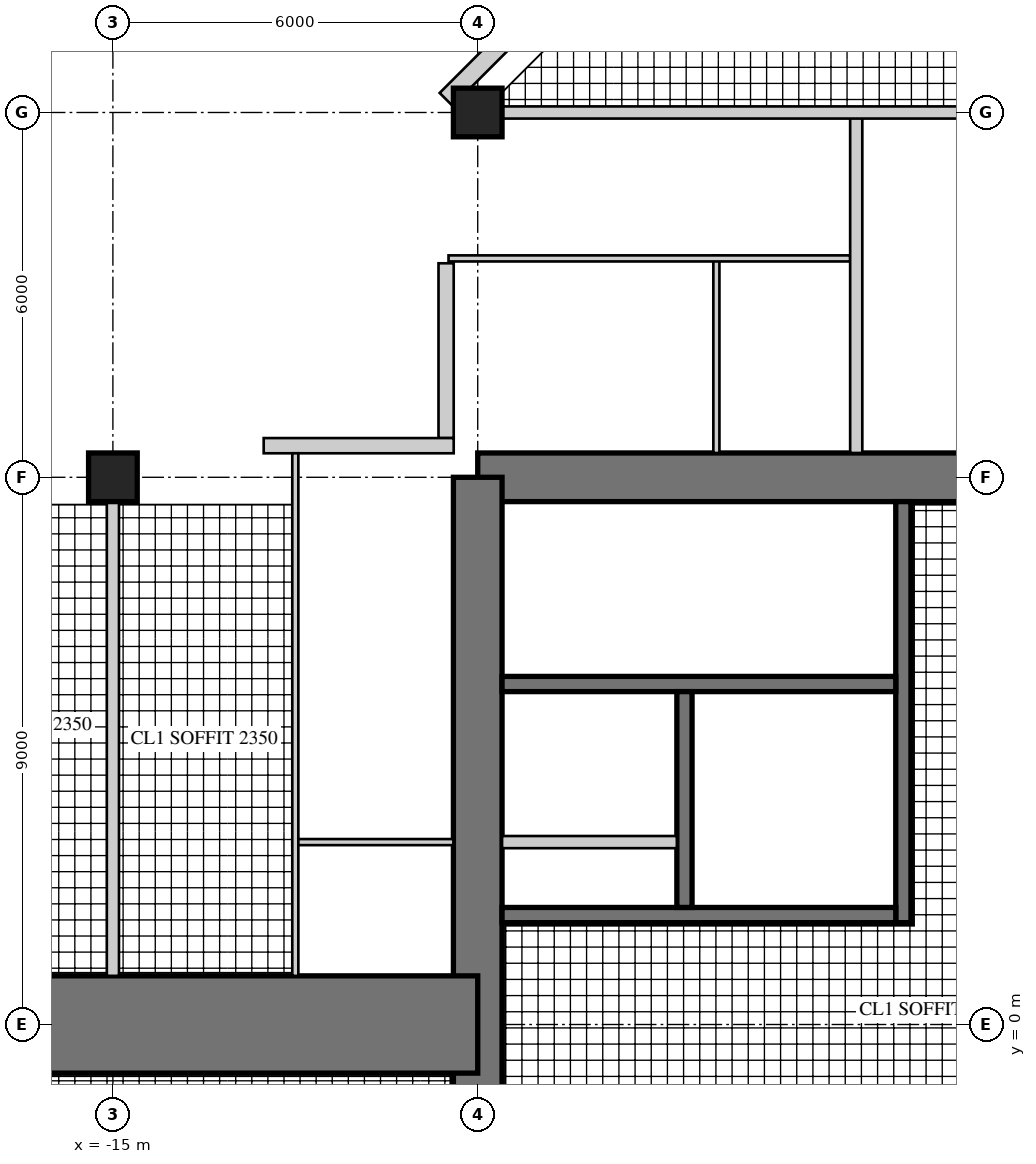
"""IFC4 building model, lengths in metres.
Left out: names, types, materials, properties, quantities, classifications, styles, units other than length and angle.
Written with IfcOpenShell. Run it as: python <this file> out.ifc"""

import sys

from ifc_helpers import new_model, si_unit, direction, frame, frame_2d, origin, origin_2d, place, context, subcontext, project, spatial, rectangle, hollow_rectangle, extrude, element, fill, save


model = new_model("IFC4")
c1 = context("Model", 3, precision=1e-05, world=origin(), true_north=direction((0.0, 1.0)))
c2 = subcontext(c1, "Body", "Model", "MODEL_VIEW")
j1 = project(units=[si_unit("LENGTHUNIT", "METRE"), si_unit("PLANEANGLEUNIT", "RADIAN")], contexts=[c1])
p1 = place(None, origin())
s1 = spatial("IfcSite", under=j1, at=p1, CompositionType="ELEMENT")
p2 = place(p1, origin())
s2 = spatial("IfcBuilding", under=s1, at=p2, CompositionType="ELEMENT")
p3 = place(p2, frame((0.0, 0.0, 235.7)))
s3 = spatial("IfcBuildingStorey", under=s2, at=p3, CompositionType="ELEMENT", Elevation=235.7)
p4 = place(p3, frame((9.0, 9.0, 0.0), z_axis=(0.0, 0.0, 1.0), x_axis=(-1.0, 0.0, 0.0)))
e1 = element("IfcWall", 1, at=p4, inside=s3, PredefinedType="SHEAR", context=c2, shape_type="SweptSolid", body=[
    extrude(rectangle(XDim=18.0, YDim=0.8, at=frame_2d((9.0, 0.0))), origin(), (0.0, 0.0, 1.0), 3.4),
])
p5 = place(p4, frame((9.8, 0.0, 0.0)))
e2 = element("IfcOpeningElement", 2, at=p5, cuts=e1, PredefinedType="OPENING", context=c2, shape_type="SweptSolid", body=[
    extrude(rectangle(XDim=1.0, YDim=2.4, at=frame_2d((0.5, 1.2))), frame((0.0, 0.41, 0.0), z_axis=(0.0, -1.0, 0.0), x_axis=(1.0, 0.0, 0.0)), (0.0, 0.0, 1.0), 0.82),
])
p6 = place(p3, frame((-9.0, 9.0, 0.0), z_axis=(0.0, 0.0, 1.0), x_axis=(0.0, -1.0, 0.0)))
e3 = element("IfcWall", 3, at=p6, inside=s3, PredefinedType="SHEAR", context=c2, shape_type="SweptSolid", body=[
    extrude(rectangle(XDim=18.0, YDim=0.8, at=frame_2d((9.0, 0.0))), origin(), (0.0, 0.0, 1.0), 3.4),
])
p7 = place(p6, frame((9.8, 0.0, 0.0)))
e4 = element("IfcOpeningElement", 4, at=p7, cuts=e3, PredefinedType="OPENING", context=c2, shape_type="SweptSolid", body=[
    extrude(rectangle(XDim=1.0, YDim=2.4, at=frame_2d((0.5, 1.2))), frame((0.0, 0.41, 0.0), z_axis=(0.0, -1.0, 0.0), x_axis=(1.0, 0.0, 0.0)), (0.0, 0.0, 1.0), 0.82),
])
p8 = place(p3, frame((-2.0, 1.675, 0.0), z_axis=(0.0, 0.0, 1.0), x_axis=(0.0, 1.0, 0.0)))
e5 = element("IfcWall", 5, at=p8, inside=s3, PredefinedType="SHEAR", context=c2, shape_type="SweptSolid", body=[
    extrude(rectangle(XDim=6.925, YDim=0.25, at=frame_2d((3.462, 0.0))), origin(), (0.0, 0.0, 1.0), 3.4),
])
p9 = place(p8, frame((0.725, 0.0, 0.0)))
e6 = element("IfcOpeningElement", 6, at=p9, cuts=e5, PredefinedType="OPENING", context=c2, shape_type="SweptSolid", body=[
    extrude(rectangle(XDim=1.0, YDim=2.1, at=frame_2d((0.5, 1.05))), frame((0.0, 0.135, 0.0), z_axis=(0.0, -1.0, 0.0), x_axis=(1.0, 0.0, 0.0)), (0.0, 0.0, 1.0), 0.27),
])
p10 = place(p3, frame((-2.125, 1.8, 0.0), z_axis=(0.0, 0.0, 1.0), x_axis=(-1.0, 0.0, 0.0)))
e7 = element("IfcWall", 7, at=p10, inside=s3, PredefinedType="SHEAR", context=c2, shape_type="SweptSolid", body=[
    extrude(rectangle(XDim=6.475, YDim=0.25, at=frame_2d((3.238, 0.0))), origin(), (0.0, 0.0, 1.0), 3.4),
])
p11 = place(p3, frame((-2.125, 5.6, 0.0), z_axis=(0.0, 0.0, 1.0), x_axis=(-1.0, 0.0, 0.0)))
e8 = element("IfcWall", 8, at=p11, inside=s3, PredefinedType="SHEAR", context=c2, shape_type="SweptSolid", body=[
    extrude(rectangle(XDim=6.475, YDim=0.25, at=frame_2d((3.238, 0.0))), origin(), (0.0, 0.0, 1.0), 3.4),
])
p12 = place(p11, frame((0.175, 0.0, 0.0)))
e9 = element("IfcOpeningElement", 9, at=p12, cuts=e8, PredefinedType="OPENING", context=c2, shape_type="SweptSolid", body=[
    extrude(rectangle(XDim=1.0, YDim=2.1, at=frame_2d((0.5, 1.05))), frame((0.0, 0.135, 0.0), z_axis=(0.0, -1.0, 0.0), x_axis=(1.0, 0.0, 0.0)), (0.0, 0.0, 1.0), 0.27),
])
p13 = place(p3, frame((-5.6, 1.925, 0.0), z_axis=(0.0, 0.0, 1.0), x_axis=(0.0, 1.0, 0.0)))
e10 = element("IfcWall", 10, at=p13, inside=s3, PredefinedType="SHEAR", context=c2, shape_type="SweptSolid", body=[
    extrude(rectangle(XDim=3.55, YDim=0.25, at=frame_2d((1.775, 0.0))), origin(), (0.0, 0.0, 1.0), 3.4),
])
p14 = place(p13, frame((1.525, 0.0, 0.0)))
e11 = element("IfcOpeningElement", 11, at=p14, cuts=e10, PredefinedType="OPENING", context=c2, shape_type="SweptSolid", body=[
    extrude(rectangle(XDim=1.1, YDim=2.2, at=frame_2d((0.55, 1.1))), frame((0.0, 0.135, 0.0), z_axis=(0.0, -1.0, 0.0), x_axis=(1.0, 0.0, 0.0)), (0.0, 0.0, 1.0), 0.27),
])
p15 = place(p13, frame((0.075, 0.0, 0.0)))
e12 = element("IfcOpeningElement", 12, at=p15, cuts=e10, PredefinedType="OPENING", context=c2, shape_type="SweptSolid", body=[
    extrude(rectangle(XDim=0.8, YDim=2.1, at=frame_2d((0.4, 1.05))), frame((0.0, 0.135, 0.0), z_axis=(0.0, -1.0, 0.0), x_axis=(1.0, 0.0, 0.0)), (0.0, 0.0, 1.0), 0.27),
])
p16 = place(p3, frame((-5.725, 3.0, 0.0), z_axis=(0.0, 0.0, 1.0), x_axis=(-1.0, 0.0, 0.0)))
e13 = element("IfcWall", 13, at=p16, inside=s3, PredefinedType="PARTITIONING", context=c2, shape_type="SweptSolid", body=[
    extrude(rectangle(XDim=2.875, YDim=0.2, at=frame_2d((1.438, 0.0))), origin(), (0.0, 0.0, 1.0), 3.4),
])
p17 = place(p3, frame((-9.0, 0.0, 0.0), z_axis=(0.0, 0.0, 1.0), x_axis=(-1.0, 0.0, 0.0)))
e14 = element("IfcWall", 14, at=p17, inside=s3, PredefinedType="SHEAR", context=c2, shape_type="SweptSolid", body=[
    extrude(rectangle(XDim=18.0, YDim=1.6, at=frame_2d((9.0, 0.0))), origin(), (0.0, 0.0, 1.0), 3.4),
])
p18 = place(p17, frame((3.8, 0.0, 0.0)))
e15 = element("IfcOpeningElement", 15, at=p18, cuts=e14, PredefinedType="OPENING", context=c2, shape_type="SweptSolid", body=[
    extrude(rectangle(XDim=1.0, YDim=2.15, at=frame_2d((0.5, 1.075))), frame((0.0, 0.81, 0.0), z_axis=(0.0, -1.0, 0.0), x_axis=(1.0, 0.0, 0.0)), (0.0, 0.0, 1.0), 1.62),
])
p19 = place(p17, frame((6.6, 0.0, 0.0)))
e16 = element("IfcOpeningElement", 16, at=p19, cuts=e14, PredefinedType="OPENING", context=c2, shape_type="SweptSolid", body=[
    extrude(rectangle(XDim=1.0, YDim=2.15, at=frame_2d((0.5, 1.075))), frame((0.0, 0.81, 0.0), z_axis=(0.0, -1.0, 0.0), x_axis=(1.0, 0.0, 0.0)), (0.0, 0.0, 1.0), 1.62),
])
p20 = place(p17, frame((13.3, 0.0, 0.0)))
e17 = element("IfcOpeningElement", 17, at=p20, cuts=e14, PredefinedType="OPENING", context=c2, shape_type="SweptSolid", body=[
    extrude(rectangle(XDim=1.0, YDim=2.2, at=frame_2d((0.5, 1.1))), frame((0.0, 0.81, 0.0), z_axis=(0.0, -1.0, 0.0), x_axis=(1.0, 0.0, 0.0)), (0.0, 0.0, 1.0), 1.62),
])
for number, where, z_axis, x_axis in (
    (18, (-9.0, 15.0, 0.0), (0.0, 0.0, 1.0), (1.0, 0.0, 0.0)),
    (19, (-15.0, 9.0, 0.0), (0.0, 0.0, 1.0), (1.0, 0.0, 0.0)),
):
    element("IfcColumn", number, at=place(p3, frame(where, z_axis=z_axis, x_axis=x_axis)), inside=s3, PredefinedType="COLUMN", context=c2, shape_type="SweptSolid", body=[
        extrude(rectangle(XDim=0.8, YDim=0.8, at=origin_2d()), origin(), (0.0, 0.0, 1.0), 3.4),
    ])
p21 = place(p3, frame((-6.135, 18.6, 0.0), z_axis=(0.0, 0.0, 1.0), x_axis=(-0.707081278264, -0.707132283189, 0.0)))
e20 = element("IfcWall", 20, at=p21, inside=s3, PredefinedType="SOLIDWALL", context=c2, shape_type="SweptSolid", body=[
    extrude(rectangle(XDim=4.787, YDim=0.3, at=frame_2d((2.393, 0.0))), origin(), (0.0, 0.0, 1.0), 3.22),
])
p22 = place(p21, frame((1.943, 0.0, 0.3)))
e21 = element("IfcOpeningElement", 21, at=p22, cuts=e20, PredefinedType="OPENING", context=c2, shape_type="SweptSolid", body=[
    extrude(rectangle(XDim=0.9, YDim=2.4, at=frame_2d((0.45, 1.2))), frame((0.0, 0.16, 0.0), z_axis=(0.0, -1.0, 0.0), x_axis=(1.0, 0.0, 0.0)), (0.0, 0.0, 1.0), 0.32),
])
p23 = place(p3, frame((-9.52, 12.52, 0.0), z_axis=(0.0, 0.0, 1.0), x_axis=(0.0, -1.0, 0.0)))
e22 = element("IfcWall", 22, at=p23, inside=s3, PredefinedType="SOLIDWALL", context=c2, shape_type="SweptSolid", body=[
    extrude(rectangle(XDim=2.875, YDim=0.25, at=frame_2d((1.438, 0.0))), origin(), (0.0, 0.0, 1.0), 3.22),
])
p24 = place(p23, frame((0.6, 0.0, 0.0)))
e23 = element("IfcOpeningElement", 23, at=p24, cuts=e22, PredefinedType="OPENING", context=c2, shape_type="SweptSolid", body=[
    extrude(rectangle(XDim=1.0, YDim=2.2, at=frame_2d((0.5, 1.1))), frame((0.0, 0.135, 0.0), z_axis=(0.0, -1.0, 0.0), x_axis=(1.0, 0.0, 0.0)), (0.0, 0.0, 1.0), 0.27),
])
p25 = place(p3, frame((-9.395, 9.52, 0.0), z_axis=(0.0, 0.0, 1.0), x_axis=(-1.0, 0.0, 0.0)))
e24 = element("IfcWall", 24, at=p25, inside=s3, PredefinedType="SOLIDWALL", context=c2, shape_type="SweptSolid", body=[
    extrude(rectangle(XDim=3.125, YDim=0.25, at=frame_2d((1.562, 0.0))), origin(), (0.0, 0.0, 1.0), 3.22),
])
p26 = place(p25, frame((0.6, 0.0, 0.0)))
e25 = element("IfcOpeningElement", 25, at=p26, cuts=e24, PredefinedType="OPENING", context=c2, shape_type="SweptSolid", body=[
    extrude(rectangle(XDim=1.0, YDim=2.2, at=frame_2d((0.5, 1.1))), frame((0.0, 0.135, 0.0), z_axis=(0.0, -1.0, 0.0), x_axis=(1.0, 0.0, 0.0)), (0.0, 0.0, 1.0), 0.27),
])
p27 = place(p3, frame((-5.075, 9.4, 0.0), z_axis=(0.0, 0.0, 1.0), x_axis=(0.0, 1.0, 0.0)))
e26 = element("IfcWall", 26, at=p27, inside=s3, PredefinedType="PARTITIONING", context=c2, shape_type="SweptSolid", body=[
    extrude(rectangle(XDim=3.25, YDim=0.1, at=frame_2d((1.625, 0.0))), origin(), (0.0, 0.0, 1.0), 3.22),
])
p28 = place(p3, frame((-2.875, 12.6, 0.0), z_axis=(0.0, 0.0, 1.0), x_axis=(-1.0, 0.0, 0.0)))
e27 = element("IfcWall", 27, at=p28, inside=s3, PredefinedType="PARTITIONING", context=c2, shape_type="SweptSolid", body=[
    extrude(rectangle(XDim=6.605, YDim=0.1, at=frame_2d((3.302, 0.0))), origin(), (0.0, 0.0, 1.0), 3.22),
])
p29 = place(p28, frame((0.55, 0.0, 0.0)))
e28 = element("IfcOpeningElement", 28, at=p29, cuts=e27, PredefinedType="OPENING", context=c2, shape_type="SweptSolid", body=[
    extrude(rectangle(XDim=0.9, YDim=2.1, at=frame_2d((0.45, 1.05))), frame((0.0, 0.06, 0.0), z_axis=(0.0, -1.0, 0.0), x_axis=(1.0, 0.0, 0.0)), (0.0, 0.0, 1.0), 0.12),
])
p30 = place(p28, frame((2.65, 0.0, 0.0)))
e29 = element("IfcOpeningElement", 29, at=p30, cuts=e27, PredefinedType="OPENING", context=c2, shape_type="SweptSolid", body=[
    extrude(rectangle(XDim=0.9, YDim=2.1, at=frame_2d((0.45, 1.05))), frame((0.0, 0.06, 0.0), z_axis=(0.0, -1.0, 0.0), x_axis=(1.0, 0.0, 0.0)), (0.0, 0.0, 1.0), 0.12),
])
p31 = place(p3, frame((-2.775, 9.4, 0.0), z_axis=(0.0, 0.0, 1.0), x_axis=(0.0, 1.0, 0.0)))
e30 = element("IfcWall", 30, at=p31, inside=s3, PredefinedType="SOLIDWALL", context=c2, shape_type="SweptSolid", body=[
    extrude(rectangle(XDim=5.6, YDim=0.2, at=frame_2d((2.8, 0.0))), origin(), (0.0, 0.0, 1.0), 3.22),
])
p32 = place(p31, frame((3.75, 0.0, 0.0)))
e31 = element("IfcOpeningElement", 31, at=p32, cuts=e30, PredefinedType="OPENING", context=c2, shape_type="SweptSolid", body=[
    extrude(rectangle(XDim=1.0, YDim=2.15, at=frame_2d((0.5, 1.075))), frame((0.0, 0.11, 0.0), z_axis=(0.0, -1.0, 0.0), x_axis=(1.0, 0.0, 0.0)), (0.0, 0.0, 1.0), 0.22),
])
p33 = place(p3, frame((-0.6, 15.0, 0.0), z_axis=(0.0, 0.0, 1.0), x_axis=(-1.0, 0.0, 0.0)))
e32 = element("IfcWall", 32, at=p33, inside=s3, PredefinedType="SOLIDWALL", context=c2, shape_type="SweptSolid", body=[
    extrude(rectangle(XDim=8.0, YDim=0.2, at=frame_2d((4.0, 0.0))), origin(), (0.0, 0.0, 1.0), 2.52),
])
p34 = place(p33, frame((0.35, 0.0, 0.0)))
e33 = element("IfcOpeningElement", 33, at=p34, cuts=e32, PredefinedType="OPENING", context=c2, shape_type="SweptSolid", body=[
    extrude(rectangle(XDim=1.0, YDim=2.2, at=frame_2d((0.5, 1.1))), frame((0.0, 0.11, 0.0), z_axis=(0.0, -1.0, 0.0), x_axis=(1.0, 0.0, 0.0)), (0.0, 0.0, 1.0), 0.22),
])
p35 = place(p3, frame((-9.4, 3.0, 0.0), z_axis=(0.0, 0.0, 1.0), x_axis=(-1.0, 0.0, 0.0)))
e34 = element("IfcWall", 34, at=p35, inside=s3, PredefinedType="PARTITIONING", context=c2, shape_type="SweptSolid", body=[
    extrude(rectangle(XDim=2.65, YDim=0.1, at=frame_2d((1.325, 0.0))), origin(), (0.0, 0.0, 1.0), 3.22),
])
p36 = place(p3, frame((-12.0, 9.395, 0.0), z_axis=(0.0, 0.0, 1.0), x_axis=(0.0, -1.0, 0.0)))
e35 = element("IfcWall", 35, at=p36, inside=s3, PredefinedType="PARTITIONING", context=c2, shape_type="SweptSolid", body=[
    extrude(rectangle(XDim=8.595, YDim=0.1, at=frame_2d((4.297, 0.0))), origin(), (0.0, 0.0, 1.0), 3.22),
])
p37 = place(p36, frame((5.045, 0.0, 0.0)))
e36 = element("IfcOpeningElement", 36, at=p37, cuts=e35, PredefinedType="OPENING", context=c2, shape_type="SweptSolid", body=[
    extrude(rectangle(XDim=0.9, YDim=2.1, at=frame_2d((0.45, 1.05))), frame((0.0, 0.06, 0.0), z_axis=(0.0, -1.0, 0.0), x_axis=(1.0, 0.0, 0.0)), (0.0, 0.0, 1.0), 0.12),
])
p38 = place(p36, frame((7.145, 0.0, 0.0)))
e37 = element("IfcOpeningElement", 37, at=p38, cuts=e35, PredefinedType="OPENING", context=c2, shape_type="SweptSolid", body=[
    extrude(rectangle(XDim=0.9, YDim=2.1, at=frame_2d((0.45, 1.05))), frame((0.0, 0.06, 0.0), z_axis=(0.0, -1.0, 0.0), x_axis=(1.0, 0.0, 0.0)), (0.0, 0.0, 1.0), 0.12),
])
p39 = place(p3, frame((-15.0, 8.6, 0.0), z_axis=(0.0, 0.0, 1.0), x_axis=(0.0, -1.0, 0.0)))
e38 = element("IfcWall", 38, at=p39, inside=s3, PredefinedType="SOLIDWALL", context=c2, shape_type="SweptSolid", body=[
    extrude(rectangle(XDim=7.8, YDim=0.2, at=frame_2d((3.9, 0.0))), origin(), (0.0, 0.0, 1.0), 2.52),
])
p40 = place(p24, origin())
e39 = element("IfcDoor", 39, at=p40, inside=s3, OperationType="SINGLE_SWING_LEFT", PredefinedType="DOOR", context=c2, shape_type="SweptSolid", body=[
    extrude(hollow_rectangle(XDim=1.0, YDim=2.2, WallThickness=0.06, at=frame_2d((0.5, 1.1))), frame((0.0, 0.025, 0.0), z_axis=(0.0, -1.0, 0.0), x_axis=(1.0, 0.0, 0.0)), (0.0, 0.0, 1.0), 0.05),
    extrude(rectangle(XDim=0.879, YDim=2.079, at=frame_2d((0.5, 1.1))), frame((0.0, 0.025, 0.0), z_axis=(0.0, -1.0, 0.0), x_axis=(1.0, 0.0, 0.0)), (0.0, 0.0, 1.0), 0.05),
])
fill(e23, e39)
p41 = place(p26, origin())
e40 = element("IfcDoor", 40, at=p41, inside=s3, OperationType="SINGLE_SWING_RIGHT", PredefinedType="DOOR", context=c2, shape_type="SweptSolid", body=[
    extrude(hollow_rectangle(XDim=1.0, YDim=2.2, WallThickness=0.06, at=frame_2d((0.5, 1.1))), frame((0.0, 0.025, 0.0), z_axis=(0.0, -1.0, 0.0), x_axis=(1.0, 0.0, 0.0)), (0.0, 0.0, 1.0), 0.05),
    extrude(rectangle(XDim=0.879, YDim=2.079, at=frame_2d((0.5, 1.1))), frame((0.0, 0.025, 0.0), z_axis=(0.0, -1.0, 0.0), x_axis=(1.0, 0.0, 0.0)), (0.0, 0.0, 1.0), 0.05),
])
fill(e25, e40)
p42 = place(p29, origin())
e41 = element("IfcDoor", 41, at=p42, inside=s3, OperationType="SINGLE_SWING_LEFT", PredefinedType="DOOR", context=c2, shape_type="SweptSolid", body=[
    extrude(rectangle(XDim=0.9, YDim=2.1, at=frame_2d((0.45, 1.05))), frame((0.0, 0.025, 0.0), z_axis=(0.0, -1.0, 0.0), x_axis=(1.0, 0.0, 0.0)), (0.0, 0.0, 1.0), 0.05),
])
fill(e28, e41)
p43 = place(p30, origin())
e42 = element("IfcDoor", 42, at=p43, inside=s3, OperationType="SINGLE_SWING_LEFT", PredefinedType="DOOR", context=c2, shape_type="SweptSolid", body=[
    extrude(rectangle(XDim=0.9, YDim=2.1, at=frame_2d((0.45, 1.05))), frame((0.0, 0.025, 0.0), z_axis=(0.0, -1.0, 0.0), x_axis=(1.0, 0.0, 0.0)), (0.0, 0.0, 1.0), 0.05),
])
fill(e29, e42)
p44 = place(p32, origin())
e43 = element("IfcDoor", 43, at=p44, inside=s3, OperationType="SINGLE_SWING_LEFT", PredefinedType="DOOR", context=c2, shape_type="SweptSolid", body=[
    extrude(rectangle(XDim=1.0, YDim=2.15, at=frame_2d((0.5, 1.075))), frame((0.0, 0.025, 0.0), z_axis=(0.0, -1.0, 0.0), x_axis=(1.0, 0.0, 0.0)), (0.0, 0.0, 1.0), 0.05),
])
fill(e31, e43)
p45 = place(p34, frame((1.0, 0.0, 0.0), z_axis=(0.0, 0.0, 1.0), x_axis=(-1.0, 0.0, 0.0)))
e44 = element("IfcDoor", 44, at=p45, inside=s3, OperationType="SINGLE_SWING_RIGHT", PredefinedType="DOOR", context=c2, shape_type="SweptSolid", body=[
    extrude(rectangle(XDim=1.0, YDim=2.2, at=frame_2d((0.5, 1.1))), frame((0.0, 0.025, 0.0), z_axis=(0.0, -1.0, 0.0), x_axis=(1.0, 0.0, 0.0)), (0.0, 0.0, 1.0), 0.05),
])
fill(e33, e44)
p46 = place(p37, origin())
e45 = element("IfcDoor", 45, at=p46, inside=s3, OperationType="SINGLE_SWING_RIGHT", PredefinedType="DOOR", context=c2, shape_type="SweptSolid", body=[
    extrude(rectangle(XDim=0.9, YDim=2.1, at=frame_2d((0.45, 1.05))), frame((0.0, 0.025, 0.0), z_axis=(0.0, -1.0, 0.0), x_axis=(1.0, 0.0, 0.0)), (0.0, 0.0, 1.0), 0.05),
])
fill(e36, e45)
p47 = place(p38, origin())
e46 = element("IfcDoor", 46, at=p47, inside=s3, OperationType="SINGLE_SWING_RIGHT", PredefinedType="DOOR", context=c2, shape_type="SweptSolid", body=[
    extrude(rectangle(XDim=0.9, YDim=2.1, at=frame_2d((0.45, 1.05))), frame((0.0, 0.025, 0.0), z_axis=(0.0, -1.0, 0.0), x_axis=(1.0, 0.0, 0.0)), (0.0, 0.0, 1.0), 0.05),
])
fill(e37, e46)
p48 = place(p18, frame((1.0, 0.0, 0.0), z_axis=(0.0, 0.0, 1.0), x_axis=(-1.0, 0.0, 0.0)))
e47 = element("IfcDoor", 47, at=p48, inside=s3, OperationType="SINGLE_SWING_RIGHT", PredefinedType="DOOR", context=c2, shape_type="SweptSolid", body=[
    extrude(rectangle(XDim=1.0, YDim=2.15, at=frame_2d((0.5, 1.075))), frame((0.0, 0.025, 0.0), z_axis=(0.0, -1.0, 0.0), x_axis=(1.0, 0.0, 0.0)), (0.0, 0.0, 1.0), 0.05),
])
fill(e15, e47)
p49 = place(p19, frame((1.0, 0.0, 0.0), z_axis=(0.0, 0.0, 1.0), x_axis=(-1.0, 0.0, 0.0)))
e48 = element("IfcDoor", 48, at=p49, inside=s3, OperationType="SINGLE_SWING_RIGHT", PredefinedType="DOOR", context=c2, shape_type="SweptSolid", body=[
    extrude(rectangle(XDim=1.0, YDim=2.15, at=frame_2d((0.5, 1.075))), frame((0.0, 0.025, 0.0), z_axis=(0.0, -1.0, 0.0), x_axis=(1.0, 0.0, 0.0)), (0.0, 0.0, 1.0), 0.05),
])
fill(e16, e48)
p50 = place(p5, origin())
e49 = element("IfcDoor", 49, at=p50, inside=s3, OperationType="SINGLE_SWING_RIGHT", PredefinedType="DOOR", context=c2, shape_type="SweptSolid", body=[
    extrude(rectangle(XDim=1.0, YDim=2.4, at=frame_2d((0.5, 1.2))), frame((0.0, 0.055, 0.0), z_axis=(0.0, -1.0, 0.0), x_axis=(1.0, 0.0, 0.0)), (0.0, 0.0, 1.0), 0.05),
])
fill(e2, e49)
p51 = place(p7, origin())
e50 = element("IfcDoor", 50, at=p51, inside=s3, OperationType="SINGLE_SWING_RIGHT", PredefinedType="DOOR", context=c2, shape_type="SweptSolid", body=[
    extrude(rectangle(XDim=1.0, YDim=2.4, at=frame_2d((0.5, 1.2))), frame((0.0, 0.055, 0.0), z_axis=(0.0, -1.0, 0.0), x_axis=(1.0, 0.0, 0.0)), (0.0, 0.0, 1.0), 0.05),
])
fill(e4, e50)
p52 = place(p9, origin())
e51 = element("IfcDoor", 51, at=p52, inside=s3, OperationType="SINGLE_SWING_LEFT", PredefinedType="DOOR", context=c2, shape_type="SweptSolid", body=[
    extrude(rectangle(XDim=1.0, YDim=2.1, at=frame_2d((0.5, 1.05))), frame((0.0, 0.025, 0.0), z_axis=(0.0, -1.0, 0.0), x_axis=(1.0, 0.0, 0.0)), (0.0, 0.0, 1.0), 0.05),
])
fill(e6, e51)
p53 = place(p12, frame((1.0, 0.0, 0.0), z_axis=(0.0, 0.0, 1.0), x_axis=(-1.0, 0.0, 0.0)))
e52 = element("IfcDoor", 52, at=p53, inside=s3, OperationType="SINGLE_SWING_RIGHT", PredefinedType="DOOR", context=c2, shape_type="SweptSolid", body=[
    extrude(rectangle(XDim=1.0, YDim=2.1, at=frame_2d((0.5, 1.05))), frame((0.0, 0.025, 0.0), z_axis=(0.0, -1.0, 0.0), x_axis=(1.0, 0.0, 0.0)), (0.0, 0.0, 1.0), 0.05),
])
fill(e9, e52)
p54 = place(p14, origin())
e53 = element("IfcDoor", 53, at=p54, inside=s3, OperationType="DOUBLE_DOOR_SLIDING", PredefinedType="DOOR", context=c2, shape_type="SweptSolid", body=[
    extrude(rectangle(XDim=1.1, YDim=2.2, at=frame_2d((0.55, 1.1))), frame((0.0, 0.025, 0.0), z_axis=(0.0, -1.0, 0.0), x_axis=(1.0, 0.0, 0.0)), (0.0, 0.0, 1.0), 0.05),
])
fill(e11, e53)
p55 = place(p15, origin())
e54 = element("IfcDoor", 54, at=p55, inside=s3, OperationType="SINGLE_SWING_LEFT", PredefinedType="DOOR", context=c2, shape_type="SweptSolid", body=[
    extrude(rectangle(XDim=0.8, YDim=2.1, at=frame_2d((0.4, 1.05))), frame((0.0, 0.025, 0.0), z_axis=(0.0, -1.0, 0.0), x_axis=(1.0, 0.0, 0.0)), (0.0, 0.0, 1.0), 0.05),
])
fill(e12, e54)
save(model, sys.argv[1])
